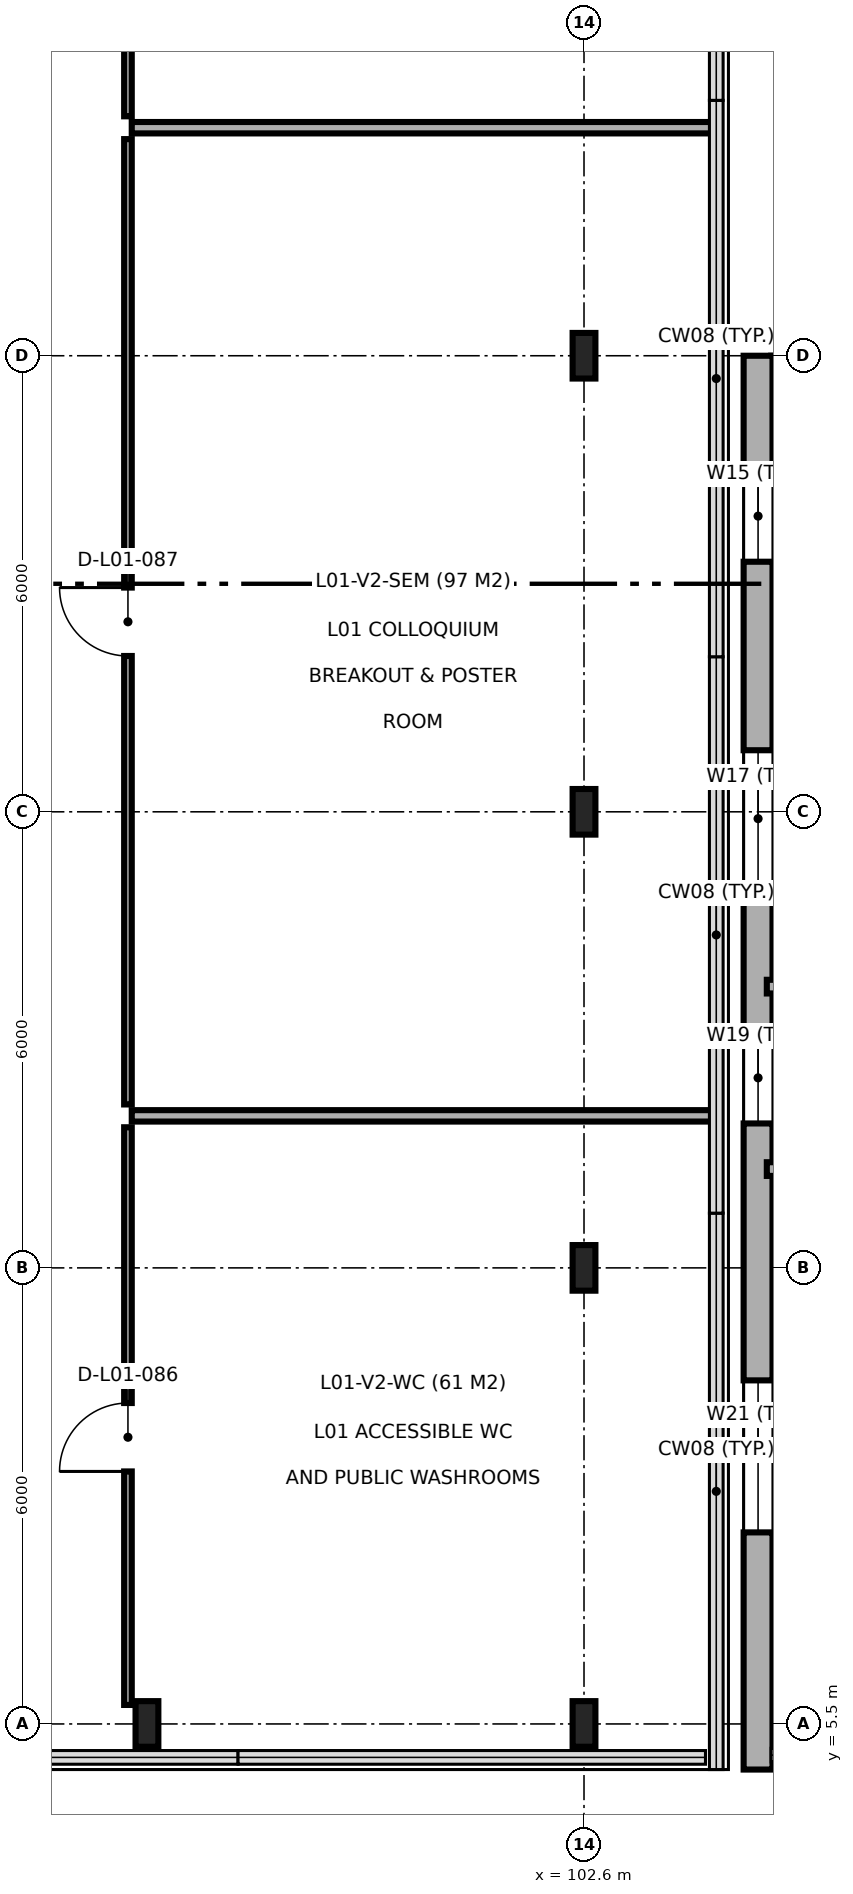
"""IFC4 building model, lengths in metres.
Left out: names, types, materials, properties, quantities, classifications, styles, units other than length and angle.
Written with IfcOpenShell. Run it as: python <this file> out.ifc"""

import sys

from ifc_helpers import new_model, si_unit, direction, frame, frame_2d, origin, origin_2d, place, context, subcontext, project, spatial, rectangle, i_section, extrude, element, fill, save


model = new_model("IFC4")
c1 = context("Model", 3, precision=1e-05, world=origin(), true_north=direction((0.0, 1.0)))
c2 = subcontext(c1, "Body", "Model", "MODEL_VIEW")
j1 = project(units=[si_unit("LENGTHUNIT", "METRE"), si_unit("PLANEANGLEUNIT", "RADIAN")], contexts=[c1])
p1 = place(None, origin())
s1 = spatial("IfcSite", under=j1, at=p1, CompositionType="ELEMENT")
p2 = place(p1, origin())
s2 = spatial("IfcBuilding", under=s1, at=p2, CompositionType="ELEMENT")
p3 = place(p2, frame((0.0, 0.0, 4.8)))
s3 = spatial("IfcBuildingStorey", under=s2, at=p3, CompositionType="ELEMENT", Elevation=4.8)
for number, where, z_axis, x_axis in (
    (1, (96.85, 5.5, 0.0), (0.0, 0.0, 1.0), (1.0, 0.0, 0.0)),
    (2, (102.6, 5.5, 0.0), (0.0, 0.0, 1.0), (1.0, 0.0, 0.0)),
    (3, (102.6, 11.5, 0.0), (0.0, 0.0, 1.0), (1.0, 0.0, 0.0)),
    (4, (102.6, 17.5, 0.0), (0.0, 0.0, 1.0), (1.0, 0.0, 0.0)),
    (5, (102.6, 23.5, 0.0), (0.0, 0.0, 1.0), (1.0, 0.0, 0.0)),
):
    element("IfcColumn", number, at=place(p3, frame(where, z_axis=z_axis, x_axis=x_axis)), inside=s3, PredefinedType="COLUMN", context=c2, shape_type="SweptSolid", body=[
        extrude(i_section(OverallWidth=0.3, OverallDepth=0.6, WebThickness=0.015, FlangeThickness=0.03, FilletRadius=0.027, at=origin_2d()), origin(), (0.0, 0.0, 1.0), 4.5),
    ])
p4 = place(p3, frame((138.962, 23.31, 0.0), z_axis=(0.0, 0.0, 1.0), x_axis=(-1.0, 0.0, 0.0)))
e6 = element("IfcWall", 6, at=p4, inside=s3, PredefinedType="SOLIDWALL", context=c2, shape_type="SweptSolid", body=[
    extrude(rectangle(XDim=33.9, YDim=0.38, at=frame_2d((16.95, 0.0))), origin(), (0.0, 0.0, 1.0), 4.25),
])
p5 = place(p4, frame((3.682, 0.0, 0.9)))
e7 = element("IfcOpeningElement", 7, at=p5, cuts=e6, PredefinedType="OPENING", context=c2, shape_type="SweptSolid", body=[
    extrude(rectangle(XDim=1.2, YDim=2.1, at=frame_2d((0.6, 1.05))), frame((0.0, 0.2, 0.0), z_axis=(0.0, -1.0, 0.0), x_axis=(1.0, 0.0, 0.0)), (0.0, 0.0, 1.0), 0.4),
])
p6 = place(p4, frame((11.642, 0.0, 0.9)))
e8 = element("IfcOpeningElement", 8, at=p6, cuts=e6, PredefinedType="OPENING", context=c2, shape_type="SweptSolid", body=[
    extrude(rectangle(XDim=1.8, YDim=2.1, at=frame_2d((0.9, 1.05))), frame((0.0, 0.2, 0.0), z_axis=(0.0, -1.0, 0.0), x_axis=(1.0, 0.0, 0.0)), (0.0, 0.0, 1.0), 0.4),
])
p7 = place(p4, frame((17.182, 0.0, 0.9)))
e9 = element("IfcOpeningElement", 9, at=p7, cuts=e6, PredefinedType="OPENING", context=c2, shape_type="SweptSolid", body=[
    extrude(rectangle(XDim=1.8, YDim=2.1, at=frame_2d((0.9, 1.05))), frame((0.0, 0.2, 0.0), z_axis=(0.0, -1.0, 0.0), x_axis=(1.0, 0.0, 0.0)), (0.0, 0.0, 1.0), 0.4),
])
p8 = place(p4, frame((20.062, 0.0, 0.9)))
e10 = element("IfcOpeningElement", 10, at=p8, cuts=e6, PredefinedType="OPENING", context=c2, shape_type="SweptSolid", body=[
    extrude(rectangle(XDim=1.2, YDim=1.8, at=frame_2d((0.6, 0.9))), frame((0.0, 0.2, 0.0), z_axis=(0.0, -1.0, 0.0), x_axis=(1.0, 0.0, 0.0)), (0.0, 0.0, 1.0), 0.4),
])
p9 = place(p4, frame((22.192, 0.0, 0.9)))
e11 = element("IfcOpeningElement", 11, at=p9, cuts=e6, PredefinedType="OPENING", context=c2, shape_type="SweptSolid", body=[
    extrude(rectangle(XDim=1.5, YDim=1.5, at=frame_2d((0.75, 0.75))), frame((0.0, 0.2, 0.0), z_axis=(0.0, -1.0, 0.0), x_axis=(1.0, 0.0, 0.0)), (0.0, 0.0, 1.0), 0.4),
])
p10 = place(p4, frame((27.162, 0.0, 0.9)))
e12 = element("IfcOpeningElement", 12, at=p10, cuts=e6, PredefinedType="OPENING", context=c2, shape_type="SweptSolid", body=[
    extrude(rectangle(XDim=2.4, YDim=1.5, at=frame_2d((1.2, 0.75))), frame((0.0, 0.2, 0.0), z_axis=(0.0, -1.0, 0.0), x_axis=(1.0, 0.0, 0.0)), (0.0, 0.0, 1.0), 0.4),
])
p11 = place(p3, frame((104.89, 23.5, 0.0), z_axis=(0.0, 0.0, 1.0), x_axis=(0.0, -1.0, 0.0)))
e13 = element("IfcWall", 13, at=p11, inside=s3, PredefinedType="SOLIDWALL", context=c2, shape_type="SweptSolid", body=[
    extrude(rectangle(XDim=18.6, YDim=0.38, at=frame_2d((9.3, 0.0))), origin(), (0.0, 0.0, 1.0), 4.25),
])
p12 = place(p11, frame((1.51, 0.0, 0.9)))
e14 = element("IfcOpeningElement", 14, at=p12, cuts=e13, PredefinedType="OPENING", context=c2, shape_type="SweptSolid", body=[
    extrude(rectangle(XDim=1.2, YDim=1.5, at=frame_2d((0.6, 0.75))), frame((0.0, 0.2, 0.0), z_axis=(0.0, -1.0, 0.0), x_axis=(1.0, 0.0, 0.0)), (0.0, 0.0, 1.0), 0.4),
])
p13 = place(p11, frame((5.19, 0.0, 0.9)))
e15 = element("IfcOpeningElement", 15, at=p13, cuts=e13, PredefinedType="OPENING", context=c2, shape_type="SweptSolid", body=[
    extrude(rectangle(XDim=1.8, YDim=1.5, at=frame_2d((0.9, 0.75))), frame((0.0, 0.2, 0.0), z_axis=(0.0, -1.0, 0.0), x_axis=(1.0, 0.0, 0.0)), (0.0, 0.0, 1.0), 0.4),
])
p14 = place(p11, frame((8.9, 0.0, 0.9)))
e16 = element("IfcOpeningElement", 16, at=p14, cuts=e13, PredefinedType="OPENING", context=c2, shape_type="SweptSolid", body=[
    extrude(rectangle(XDim=1.2, YDim=2.4, at=frame_2d((0.6, 1.2))), frame((0.0, 0.2, 0.0), z_axis=(0.0, -1.0, 0.0), x_axis=(1.0, 0.0, 0.0)), (0.0, 0.0, 1.0), 0.4),
])
p15 = place(p11, frame((13.48, 0.0, 0.9)))
e17 = element("IfcOpeningElement", 17, at=p15, cuts=e13, PredefinedType="OPENING", context=c2, shape_type="SweptSolid", body=[
    extrude(rectangle(XDim=2.0, YDim=2.4, at=frame_2d((1.0, 1.2))), frame((0.0, 0.2, 0.0), z_axis=(0.0, -1.0, 0.0), x_axis=(1.0, 0.0, 0.0)), (0.0, 0.0, 1.0), 0.4),
])
p16 = place(p3, frame((105.005, 12.8, 0.0), z_axis=(0.0, 0.0, 1.0), x_axis=(1.0, 0.0, 0.0)))
e18 = element("IfcWall", 18, at=p16, inside=s3, PredefinedType="PARTITIONING", context=c2, shape_type="SweptSolid", body=[
    extrude(rectangle(XDim=34.495, YDim=0.18, at=frame_2d((17.248, 0.0))), origin(), (0.0, 0.0, 1.0), 4.25),
])
p17 = place(p16, frame((6.011, 0.0, 0.0)))
e19 = element("IfcOpeningElement", 19, at=p17, cuts=e18, PredefinedType="OPENING", context=c2, shape_type="SweptSolid", body=[
    extrude(rectangle(XDim=1.1, YDim=2.15, at=frame_2d((0.55, 1.075))), frame((0.0, 0.1, 0.0), z_axis=(0.0, -1.0, 0.0), x_axis=(1.0, 0.0, 0.0)), (0.0, 0.0, 1.0), 0.2),
])
p18 = place(p16, frame((11.548, 0.0, 0.0)))
e20 = element("IfcOpeningElement", 20, at=p18, cuts=e18, PredefinedType="OPENING", context=c2, shape_type="SweptSolid", body=[
    extrude(rectangle(XDim=1.5, YDim=2.2, at=frame_2d((0.75, 1.1))), frame((0.0, 0.1, 0.0), z_axis=(0.0, -1.0, 0.0), x_axis=(1.0, 0.0, 0.0)), (0.0, 0.0, 1.0), 0.2),
])
p19 = place(p16, frame((27.548, 0.0, 0.0)))
e21 = element("IfcOpeningElement", 21, at=p19, cuts=e18, PredefinedType="OPENING", context=c2, shape_type="SweptSolid", body=[
    extrude(rectangle(XDim=0.9, YDim=2.1, at=frame_2d((0.45, 1.05))), frame((0.0, 0.1, 0.0), z_axis=(0.0, -1.0, 0.0), x_axis=(1.0, 0.0, 0.0)), (0.0, 0.0, 1.0), 0.2),
])
p20 = place(p3, frame((105.005, 15.2, 0.0), z_axis=(0.0, 0.0, 1.0), x_axis=(1.0, 0.0, 0.0)))
e22 = element("IfcWall", 22, at=p20, inside=s3, PredefinedType="PARTITIONING", context=c2, shape_type="SweptSolid", body=[
    extrude(rectangle(XDim=34.495, YDim=0.18, at=frame_2d((17.248, 0.0))), origin(), (0.0, 0.0, 1.0), 4.25),
])
p21 = place(p20, frame((7.391, 0.0, 0.0)))
e23 = element("IfcOpeningElement", 23, at=p21, cuts=e22, PredefinedType="OPENING", context=c2, shape_type="SweptSolid", body=[
    extrude(rectangle(XDim=0.9, YDim=2.1, at=frame_2d((0.45, 1.05))), frame((0.0, 0.1, 0.0), z_axis=(0.0, -1.0, 0.0), x_axis=(1.0, 0.0, 0.0)), (0.0, 0.0, 1.0), 0.2),
])
p22 = place(p20, frame((18.45, 0.0, 0.0)))
e24 = element("IfcOpeningElement", 24, at=p22, cuts=e22, PredefinedType="OPENING", context=c2, shape_type="SweptSolid", body=[
    extrude(rectangle(XDim=0.95, YDim=2.1, at=frame_2d((0.475, 1.05))), frame((0.0, 0.1, 0.0), z_axis=(0.0, -1.0, 0.0), x_axis=(1.0, 0.0, 0.0)), (0.0, 0.0, 1.0), 0.2),
])
p23 = place(p20, frame((27.466, 0.0, 0.0)))
e25 = element("IfcOpeningElement", 25, at=p23, cuts=e22, PredefinedType="OPENING", context=c2, shape_type="SweptSolid", body=[
    extrude(rectangle(XDim=1.0, YDim=2.15, at=frame_2d((0.5, 1.075))), frame((0.0, 0.1, 0.0), z_axis=(0.0, -1.0, 0.0), x_axis=(1.0, 0.0, 0.0)), (0.0, 0.0, 1.0), 0.2),
])
for number, where, z_axis, x_axis in (
    (26, (96.65, 13.5, 0.0), (0.0, 0.0, 1.0), (1.0, 0.0, 0.0)),
    (27, (96.65, 26.5, 0.0), (0.0, 0.0, 1.0), (1.0, 0.0, 0.0)),
):
    element("IfcWall", number, at=place(p3, frame(where, z_axis=z_axis, x_axis=x_axis)), inside=s3, PredefinedType="PARTITIONING", context=c2, shape_type="SweptSolid", body=[
        extrude(rectangle(XDim=7.63, YDim=0.15, at=frame_2d((3.815, 0.0))), origin(), (0.0, 0.0, 1.0), 4.25),
    ])
p24 = place(p3, frame((96.6, 5.75, 0.0), z_axis=(0.0, 0.0, 1.0), x_axis=(0.0, 1.0, 0.0)))
e28 = element("IfcWall", 28, at=p24, inside=s3, PredefinedType="PARTITIONING", context=c2, shape_type="SweptSolid", body=[
    extrude(rectangle(XDim=7.6, YDim=0.1, at=frame_2d((3.8, 0.0))), origin(), (0.0, 0.0, 1.0), 4.25),
])
p25 = place(p24, frame((3.072, 0.0, 0.0)))
e29 = element("IfcOpeningElement", 29, at=p25, cuts=e28, PredefinedType="OPENING", context=c2, shape_type="SweptSolid", body=[
    extrude(rectangle(XDim=0.9, YDim=2.1, at=frame_2d((0.45, 1.05))), frame((0.0, 0.06, 0.0), z_axis=(0.0, -1.0, 0.0), x_axis=(1.0, 0.0, 0.0)), (0.0, 0.0, 1.0), 0.12),
])
p26 = place(p3, frame((96.6, 13.65, 0.0), z_axis=(0.0, 0.0, 1.0), x_axis=(0.0, 1.0, 0.0)))
e30 = element("IfcWall", 30, at=p26, inside=s3, PredefinedType="PARTITIONING", context=c2, shape_type="SweptSolid", body=[
    extrude(rectangle(XDim=12.7, YDim=0.1, at=frame_2d((6.35, 0.0))), origin(), (0.0, 0.0, 1.0), 4.25),
])
p27 = place(p26, frame((5.9, 0.0, 0.0)))
e31 = element("IfcOpeningElement", 31, at=p27, cuts=e30, PredefinedType="OPENING", context=c2, shape_type="SweptSolid", body=[
    extrude(rectangle(XDim=0.9, YDim=2.1, at=frame_2d((0.45, 1.05))), frame((0.0, 0.06, 0.0), z_axis=(0.0, -1.0, 0.0), x_axis=(1.0, 0.0, 0.0)), (0.0, 0.0, 1.0), 0.12),
])
p28 = place(p3, frame((96.6, 26.65, 0.0), z_axis=(0.0, 0.0, 1.0), x_axis=(0.0, 1.0, 0.0)))
e32 = element("IfcWall", 32, at=p28, inside=s3, PredefinedType="PARTITIONING", context=c2, shape_type="SweptSolid", body=[
    extrude(rectangle(XDim=14.6, YDim=0.1, at=frame_2d((7.3, 0.0))), origin(), (0.0, 0.0, 1.0), 4.25),
])
p29 = place(p28, frame((6.839, 0.0, 0.0)))
e33 = element("IfcOpeningElement", 33, at=p29, cuts=e32, PredefinedType="OPENING", context=c2, shape_type="SweptSolid", body=[
    extrude(rectangle(XDim=0.95, YDim=2.1, at=frame_2d((0.475, 1.05))), frame((0.0, 0.06, 0.0), z_axis=(0.0, -1.0, 0.0), x_axis=(1.0, 0.0, 0.0)), (0.0, 0.0, 1.0), 0.12),
])
p30 = place(p12, origin())
e34 = element("IfcWindow", 34, at=p30, inside=s3, PartitioningType="SINGLE_PANEL", PredefinedType="WINDOW", context=c2, shape_type="SweptSolid", body=[
    extrude(rectangle(XDim=1.2, YDim=1.5, at=frame_2d((0.6, 0.75))), frame((0.0, 0.03, 0.0), z_axis=(0.0, -1.0, 0.0), x_axis=(1.0, 0.0, 0.0)), (0.0, 0.0, 1.0), 0.06),
])
fill(e14, e34)
p31 = place(p13, origin())
e35 = element("IfcWindow", 35, at=p31, inside=s3, PartitioningType="SINGLE_PANEL", PredefinedType="WINDOW", context=c2, shape_type="SweptSolid", body=[
    extrude(rectangle(XDim=1.8, YDim=1.5, at=frame_2d((0.9, 0.75))), frame((0.0, 0.03, 0.0), z_axis=(0.0, -1.0, 0.0), x_axis=(1.0, 0.0, 0.0)), (0.0, 0.0, 1.0), 0.06),
])
fill(e15, e35)
p32 = place(p14, origin())
e36 = element("IfcWindow", 36, at=p32, inside=s3, PartitioningType="SINGLE_PANEL", PredefinedType="WINDOW", context=c2, shape_type="SweptSolid", body=[
    extrude(rectangle(XDim=1.2, YDim=2.4, at=frame_2d((0.6, 1.2))), frame((0.0, 0.03, 0.0), z_axis=(0.0, -1.0, 0.0), x_axis=(1.0, 0.0, 0.0)), (0.0, 0.0, 1.0), 0.06),
])
fill(e16, e36)
p33 = place(p15, origin())
e37 = element("IfcWindow", 37, at=p33, inside=s3, PartitioningType="SINGLE_PANEL", PredefinedType="WINDOW", context=c2, shape_type="SweptSolid", body=[
    extrude(rectangle(XDim=2.0, YDim=2.4, at=frame_2d((1.0, 1.2))), frame((0.0, 0.03, 0.0), z_axis=(0.0, -1.0, 0.0), x_axis=(1.0, 0.0, 0.0)), (0.0, 0.0, 1.0), 0.06),
])
fill(e17, e37)
p34 = place(p25, origin())
e38 = element("IfcDoor", 38, at=p34, inside=s3, OperationType="SINGLE_SWING_LEFT", PredefinedType="DOOR", context=c2, shape_type="SweptSolid", body=[
    extrude(rectangle(XDim=0.9, YDim=2.1, at=frame_2d((0.45, 1.05))), frame((0.0, 0.025, 0.0), z_axis=(0.0, -1.0, 0.0), x_axis=(1.0, 0.0, 0.0)), (0.0, 0.0, 1.0), 0.05),
])
fill(e29, e38)
p35 = place(p27, origin())
e39 = element("IfcDoor", 39, at=p35, inside=s3, OperationType="SINGLE_SWING_RIGHT", PredefinedType="DOOR", context=c2, shape_type="SweptSolid", body=[
    extrude(rectangle(XDim=0.9, YDim=2.1, at=frame_2d((0.45, 1.05))), frame((0.0, 0.025, 0.0), z_axis=(0.0, -1.0, 0.0), x_axis=(1.0, 0.0, 0.0)), (0.0, 0.0, 1.0), 0.05),
])
fill(e31, e39)
save(model, sys.argv[1])
